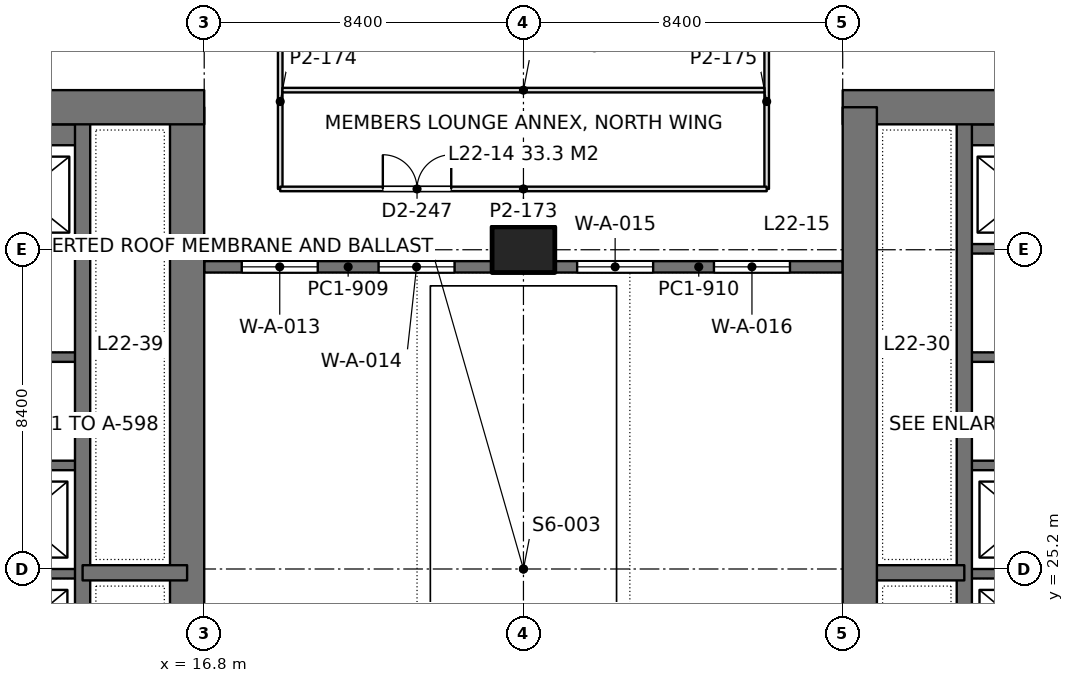
"""IFC4 building model, lengths in metres.
Left out: names, types, materials, properties, quantities, classifications, styles, units other than length and angle.
Written with IfcOpenShell. Run it as: python <this file> out.ifc"""

import sys

from ifc_helpers import new_model, si_unit, direction, frame, frame_2d, origin, origin_2d, place, context, subcontext, project, spatial, rectangle, extrude, element, fill, save


model = new_model("IFC4")
c1 = context("Model", 3, precision=1e-05, world=origin(), true_north=direction((0.0, 1.0)))
c2 = subcontext(c1, "Body", "Model", "MODEL_VIEW")
j1 = project(units=[si_unit("LENGTHUNIT", "METRE"), si_unit("PLANEANGLEUNIT", "RADIAN")], contexts=[c1])
p1 = place(None, origin())
s1 = spatial("IfcSite", under=j1, at=p1, CompositionType="ELEMENT")
p2 = place(p1, origin())
s2 = spatial("IfcBuilding", under=s1, at=p2, CompositionType="ELEMENT")
p3 = place(p2, frame((0.0, 0.0, 100.8)))
s3 = spatial("IfcBuildingStorey", under=s2, at=p3, CompositionType="ELEMENT", Elevation=100.8)
p4 = place(p3, frame((25.2, 33.6, 0.0), z_axis=(0.0, 0.0, 1.0), x_axis=(1.0, 0.0, 0.0)))
e1 = element("IfcColumn", 1, at=p4, inside=s3, PredefinedType="COLUMN", context=c2, shape_type="SweptSolid", body=[
    extrude(rectangle(XDim=1.65, YDim=1.2, at=origin_2d()), origin(), (0.0, 0.0, 1.0), 4.2),
])
p5 = place(p3, frame((-1.2, 37.35, 0.0), z_axis=(0.0, 0.0, 1.0), x_axis=(1.0, 0.0, 0.0)))
e2 = element("IfcWall", 2, at=p5, inside=s3, PredefinedType="SHEAR", context=c2, shape_type="SweptSolid", body=[
    extrude(rectangle(XDim=18.0, YDim=0.9, at=frame_2d((9.0, 0.0))), origin(), (0.0, 0.0, 1.0), 4.2),
])
p6 = place(p5, frame((8.95, 0.0, 0.0)))
e3 = element("IfcOpeningElement", 3, at=p6, cuts=e2, PredefinedType="OPENING", context=c2, shape_type="SweptSolid", body=[
    extrude(rectangle(XDim=1.8, YDim=2.4, at=frame_2d((0.9, 1.2))), frame((0.0, 0.46, 0.0), z_axis=(0.0, -1.0, 0.0), x_axis=(1.0, 0.0, 0.0)), (0.0, 0.0, 1.0), 0.92),
])
p7 = place(p3, frame((16.35, 22.1, 0.0), z_axis=(0.0, 0.0, 1.0), x_axis=(0.0, 1.0, 0.0)))
e4 = element("IfcWall", 4, at=p7, inside=s3, PredefinedType="SHEAR", context=c2, shape_type="SweptSolid", body=[
    extrude(rectangle(XDim=15.25, YDim=0.9, at=frame_2d((7.625, 0.0))), origin(), (0.0, 0.0, 1.0), 4.2),
])
p8 = place(p3, frame((13.6, 22.225, 0.0), z_axis=(0.0, 0.0, 1.0), x_axis=(0.0, 1.0, 0.0)))
e5 = element("IfcWall", 5, at=p8, inside=s3, PredefinedType="SHEAR", context=c2, shape_type="SweptSolid", body=[
    extrude(rectangle(XDim=15.125, YDim=0.4, at=frame_2d((7.562, 0.0))), origin(), (0.0, 0.0, 1.0), 4.2),
])
p9 = place(p3, frame((13.6, 25.1, 0.0), z_axis=(0.0, 0.0, 1.0), x_axis=(1.0, 0.0, 0.0)))
e6 = element("IfcWall", 6, at=p9, inside=s3, PredefinedType="SHEAR", context=c2, shape_type="SweptSolid", body=[
    extrude(rectangle(XDim=2.75, YDim=0.4, at=frame_2d((1.375, 0.0))), origin(), (0.0, 0.0, 1.0), 4.2),
])
for number, where, z_axis, x_axis in (
    (7, (10.4, 25.075, 0.0), (0.0, 0.0, 1.0), (1.0, 0.0, 0.0)),
    (8, (10.4, 27.925, 0.0), (0.0, 0.0, 1.0), (1.0, 0.0, 0.0)),
    (9, (10.4, 30.775, 0.0), (0.0, 0.0, 1.0), (1.0, 0.0, 0.0)),
    (10, (10.4, 33.625, 0.0), (0.0, 0.0, 1.0), (1.0, 0.0, 0.0)),
):
    element("IfcWall", number, at=place(p3, frame(where, z_axis=z_axis, x_axis=x_axis)), inside=s3, PredefinedType="SHEAR", context=c2, shape_type="SweptSolid", body=[
        extrude(rectangle(XDim=3.2, YDim=0.25, at=frame_2d((1.6, 0.0))), origin(), (0.0, 0.0, 1.0), 4.2),
    ])
p10 = place(p3, frame((10.4, 36.625, 0.0), z_axis=(0.0, 0.0, 1.0), x_axis=(1.0, 0.0, 0.0)))
e11 = element("IfcWall", 11, at=p10, inside=s3, PredefinedType="SHEAR", context=c2, shape_type="SweptSolid", body=[
    extrude(rectangle(XDim=3.2, YDim=0.55, at=frame_2d((1.6, 0.0))), origin(), (0.0, 0.0, 1.0), 4.2),
])
p11 = place(p3, frame((33.6, 37.35, 0.0), z_axis=(0.0, 0.0, 1.0), x_axis=(1.0, 0.0, 0.0)))
e12 = element("IfcWall", 12, at=p11, inside=s3, PredefinedType="SHEAR", context=c2, shape_type="SweptSolid", body=[
    extrude(rectangle(XDim=18.0, YDim=0.9, at=frame_2d((9.0, 0.0))), origin(), (0.0, 0.0, 1.0), 4.2),
])
p12 = place(p11, frame((7.25, 0.0, 0.0)))
e13 = element("IfcOpeningElement", 13, at=p12, cuts=e12, PredefinedType="OPENING", context=c2, shape_type="SweptSolid", body=[
    extrude(rectangle(XDim=1.8, YDim=2.4, at=frame_2d((0.9, 1.2))), frame((0.0, 0.46, 0.0), z_axis=(0.0, -1.0, 0.0), x_axis=(1.0, 0.0, 0.0)), (0.0, 0.0, 1.0), 0.92),
])
p13 = place(p3, frame((34.05, 22.1, 0.0), z_axis=(0.0, 0.0, 1.0), x_axis=(0.0, 1.0, 0.0)))
e14 = element("IfcWall", 14, at=p13, inside=s3, PredefinedType="SHEAR", context=c2, shape_type="SweptSolid", body=[
    extrude(rectangle(XDim=15.25, YDim=0.9, at=frame_2d((7.625, 0.0))), origin(), (0.0, 0.0, 1.0), 4.2),
])
p14 = place(p3, frame((36.8, 22.225, 0.0), z_axis=(0.0, 0.0, 1.0), x_axis=(0.0, 1.0, 0.0)))
e15 = element("IfcWall", 15, at=p14, inside=s3, PredefinedType="SHEAR", context=c2, shape_type="SweptSolid", body=[
    extrude(rectangle(XDim=15.125, YDim=0.4, at=frame_2d((7.562, 0.0))), origin(), (0.0, 0.0, 1.0), 4.2),
])
p15 = place(p3, frame((36.8, 25.1, 0.0), z_axis=(0.0, 0.0, 1.0), x_axis=(-1.0, 0.0, 0.0)))
e16 = element("IfcWall", 16, at=p15, inside=s3, PredefinedType="SHEAR", context=c2, shape_type="SweptSolid", body=[
    extrude(rectangle(XDim=2.75, YDim=0.4, at=frame_2d((1.375, 0.0))), origin(), (0.0, 0.0, 1.0), 4.2),
])
for number, where, z_axis, x_axis in (
    (17, (40.0, 25.075, 0.0), (0.0, 0.0, 1.0), (-1.0, 0.0, 0.0)),
    (18, (40.0, 27.925, 0.0), (0.0, 0.0, 1.0), (-1.0, 0.0, 0.0)),
    (19, (40.0, 30.775, 0.0), (0.0, 0.0, 1.0), (-1.0, 0.0, 0.0)),
    (20, (40.0, 33.625, 0.0), (0.0, 0.0, 1.0), (-1.0, 0.0, 0.0)),
):
    element("IfcWall", number, at=place(p3, frame(where, z_axis=z_axis, x_axis=x_axis)), inside=s3, PredefinedType="SHEAR", context=c2, shape_type="SweptSolid", body=[
        extrude(rectangle(XDim=3.2, YDim=0.25, at=frame_2d((1.6, 0.0))), origin(), (0.0, 0.0, 1.0), 4.2),
    ])
p16 = place(p3, frame((40.0, 36.625, 0.0), z_axis=(0.0, 0.0, 1.0), x_axis=(-1.0, 0.0, 0.0)))
e21 = element("IfcWall", 21, at=p16, inside=s3, PredefinedType="SHEAR", context=c2, shape_type="SweptSolid", body=[
    extrude(rectangle(XDim=3.2, YDim=0.55, at=frame_2d((1.6, 0.0))), origin(), (0.0, 0.0, 1.0), 4.2),
])
p17 = place(p3, frame((16.8, 33.15, 0.0), z_axis=(0.0, 0.0, 1.0), x_axis=(1.0, 0.0, 0.0)))
e22 = element("IfcWall", 22, at=p17, inside=s3, PredefinedType="SOLIDWALL", context=c2, shape_type="SweptSolid", body=[
    extrude(rectangle(XDim=7.575, YDim=0.3, at=frame_2d((3.788, 0.0))), origin(), (0.0, 0.0, 1.0), 4.05),
])
p18 = place(p17, frame((0.988, 0.0, 0.1)))
e23 = element("IfcOpeningElement", 23, at=p18, cuts=e22, PredefinedType="OPENING", context=c2, shape_type="SweptSolid", body=[
    extrude(rectangle(XDim=2.0, YDim=3.0, at=frame_2d((1.0, 1.5))), frame((0.0, 0.16, 0.0), z_axis=(0.0, -1.0, 0.0), x_axis=(1.0, 0.0, 0.0)), (0.0, 0.0, 1.0), 0.32),
])
p19 = place(p17, frame((4.587, 0.0, 0.1)))
e24 = element("IfcOpeningElement", 24, at=p19, cuts=e22, PredefinedType="OPENING", context=c2, shape_type="SweptSolid", body=[
    extrude(rectangle(XDim=2.0, YDim=3.0, at=frame_2d((1.0, 1.5))), frame((0.0, 0.16, 0.0), z_axis=(0.0, -1.0, 0.0), x_axis=(1.0, 0.0, 0.0)), (0.0, 0.0, 1.0), 0.32),
])
p20 = place(p3, frame((26.025, 33.15, 0.0), z_axis=(0.0, 0.0, 1.0), x_axis=(1.0, 0.0, 0.0)))
e25 = element("IfcWall", 25, at=p20, inside=s3, PredefinedType="SOLIDWALL", context=c2, shape_type="SweptSolid", body=[
    extrude(rectangle(XDim=7.575, YDim=0.3, at=frame_2d((3.788, 0.0))), origin(), (0.0, 0.0, 1.0), 4.05),
])
p21 = place(p20, frame((0.587, 0.0, 0.1)))
e26 = element("IfcOpeningElement", 26, at=p21, cuts=e25, PredefinedType="OPENING", context=c2, shape_type="SweptSolid", body=[
    extrude(rectangle(XDim=2.0, YDim=3.0, at=frame_2d((1.0, 1.5))), frame((0.0, 0.16, 0.0), z_axis=(0.0, -1.0, 0.0), x_axis=(1.0, 0.0, 0.0)), (0.0, 0.0, 1.0), 0.32),
])
p22 = place(p20, frame((4.188, 0.0, 0.1)))
e27 = element("IfcOpeningElement", 27, at=p22, cuts=e25, PredefinedType="OPENING", context=c2, shape_type="SweptSolid", body=[
    extrude(rectangle(XDim=2.0, YDim=3.0, at=frame_2d((1.0, 1.5))), frame((0.0, 0.16, 0.0), z_axis=(0.0, -1.0, 0.0), x_axis=(1.0, 0.0, 0.0)), (0.0, 0.0, 1.0), 0.32),
])
for number, where, z_axis, x_axis in (
    (28, (18.8, 35.2, 0.0), (0.0, 0.0, 1.0), (0.0, 1.0, 0.0)),
    (29, (31.6, 35.2, 0.0), (0.0, 0.0, 1.0), (0.0, 1.0, 0.0)),
):
    element("IfcWall", number, at=place(p3, frame(where, z_axis=z_axis, x_axis=x_axis)), inside=s3, PredefinedType="PARTITIONING", context=c2, shape_type="SweptSolid", body=[
        extrude(rectangle(XDim=4.6, YDim=0.12, at=frame_2d((2.3, 0.0))), origin(), (0.0, 0.0, 1.0), 4.05),
    ])
p23 = place(p3, frame((18.8, 35.2, 0.0), z_axis=(0.0, 0.0, 1.0), x_axis=(1.0, 0.0, 0.0)))
e30 = element("IfcWall", 30, at=p23, inside=s3, PredefinedType="PARTITIONING", context=c2, shape_type="SweptSolid", body=[
    extrude(rectangle(XDim=12.8, YDim=0.12, at=frame_2d((6.4, 0.0))), origin(), (0.0, 0.0, 1.0), 3.55),
])
p24 = place(p23, frame((2.7, 0.0, 0.0)))
e31 = element("IfcOpeningElement", 31, at=p24, cuts=e30, PredefinedType="OPENING", context=c2, shape_type="SweptSolid", body=[
    extrude(rectangle(XDim=1.8, YDim=2.2, at=frame_2d((0.9, 1.1))), frame((0.0, 0.07, 0.0), z_axis=(0.0, -1.0, 0.0), x_axis=(1.0, 0.0, 0.0)), (0.0, 0.0, 1.0), 0.14),
])
p25 = place(p3, frame((18.858, 37.8, 0.0), z_axis=(0.0, 0.0, 1.0), x_axis=(1.0, 0.0, 0.0)))
e32 = element("IfcWall", 32, at=p25, inside=s3, PredefinedType="PARTITIONING", context=c2, shape_type="SweptSolid", body=[
    extrude(rectangle(XDim=12.684, YDim=0.12, at=frame_2d((6.342, 0.0))), origin(), (0.0, 0.0, 1.0), 3.55),
])
p26 = place(p18, origin())
e33 = element("IfcWindow", 33, at=p26, inside=s3, PartitioningType="SINGLE_PANEL", PredefinedType="WINDOW", context=c2, shape_type="SweptSolid", body=[
    extrude(rectangle(XDim=2.0, YDim=3.0, at=frame_2d((1.0, 1.5))), frame((0.0, 0.03, 0.0), z_axis=(0.0, -1.0, 0.0), x_axis=(1.0, 0.0, 0.0)), (0.0, 0.0, 1.0), 0.06),
])
fill(e23, e33)
p27 = place(p19, origin())
e34 = element("IfcWindow", 34, at=p27, inside=s3, PartitioningType="SINGLE_PANEL", PredefinedType="WINDOW", context=c2, shape_type="SweptSolid", body=[
    extrude(rectangle(XDim=2.0, YDim=3.0, at=frame_2d((1.0, 1.5))), frame((0.0, 0.03, 0.0), z_axis=(0.0, -1.0, 0.0), x_axis=(1.0, 0.0, 0.0)), (0.0, 0.0, 1.0), 0.06),
])
fill(e24, e34)
p28 = place(p21, origin())
e35 = element("IfcWindow", 35, at=p28, inside=s3, PartitioningType="SINGLE_PANEL", PredefinedType="WINDOW", context=c2, shape_type="SweptSolid", body=[
    extrude(rectangle(XDim=2.0, YDim=3.0, at=frame_2d((1.0, 1.5))), frame((0.0, 0.03, 0.0), z_axis=(0.0, -1.0, 0.0), x_axis=(1.0, 0.0, 0.0)), (0.0, 0.0, 1.0), 0.06),
])
fill(e26, e35)
p29 = place(p22, origin())
e36 = element("IfcWindow", 36, at=p29, inside=s3, PartitioningType="SINGLE_PANEL", PredefinedType="WINDOW", context=c2, shape_type="SweptSolid", body=[
    extrude(rectangle(XDim=2.0, YDim=3.0, at=frame_2d((1.0, 1.5))), frame((0.0, 0.03, 0.0), z_axis=(0.0, -1.0, 0.0), x_axis=(1.0, 0.0, 0.0)), (0.0, 0.0, 1.0), 0.06),
])
fill(e27, e36)
p30 = place(p24, origin())
e37 = element("IfcDoor", 37, at=p30, inside=s3, OperationType="DOUBLE_DOOR_SINGLE_SWING", PredefinedType="DOOR", context=c2, shape_type="SweptSolid", body=[
    extrude(rectangle(XDim=1.8, YDim=2.2, at=frame_2d((0.9, 1.1))), frame((0.0, 0.025, 0.0), z_axis=(0.0, -1.0, 0.0), x_axis=(1.0, 0.0, 0.0)), (0.0, 0.0, 1.0), 0.05),
])
fill(e31, e37)
save(model, sys.argv[1])
